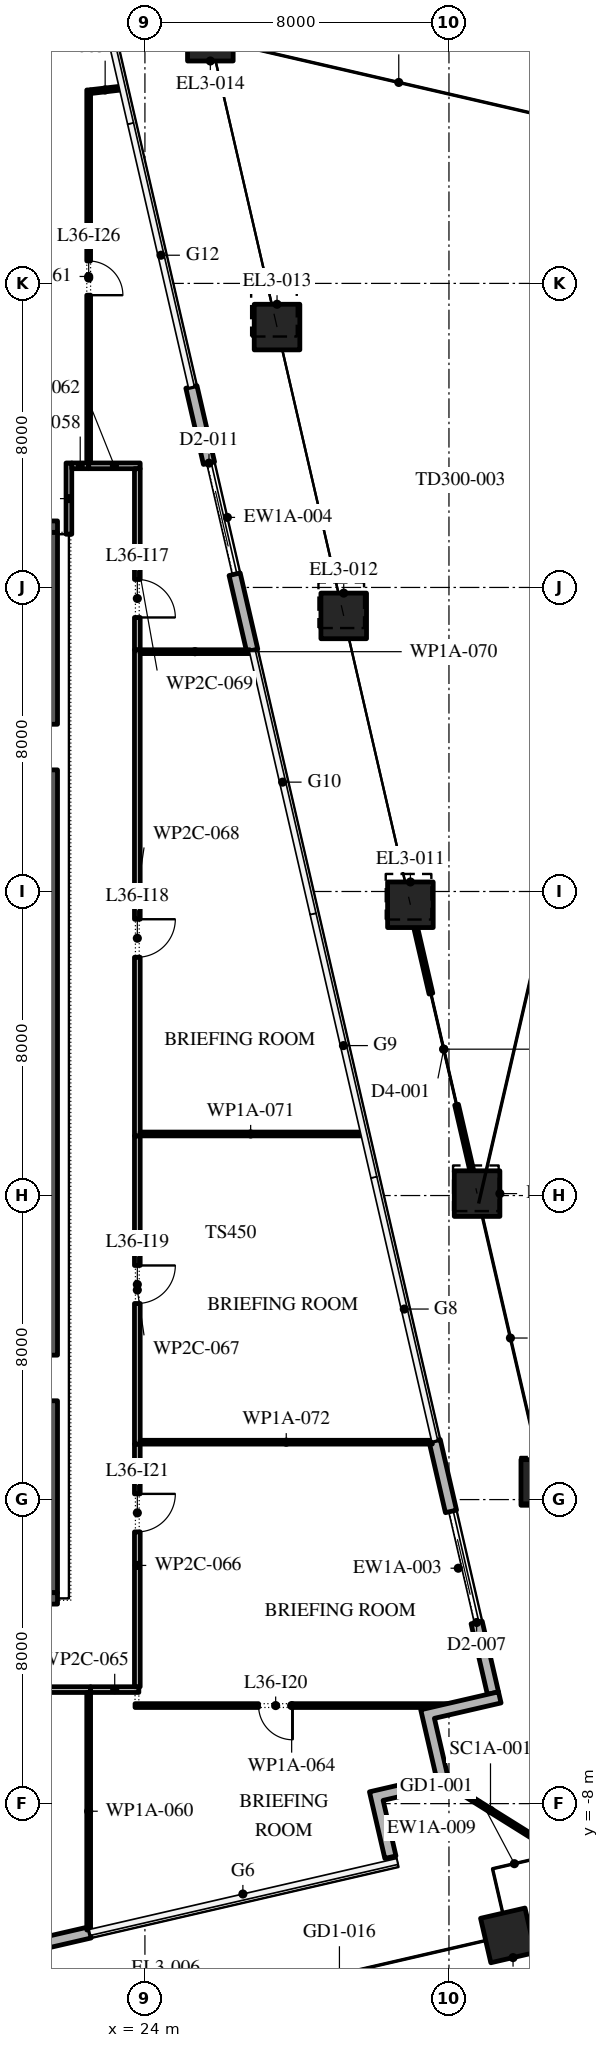
"""IFC4 building model, lengths in metres.
Left out: names, types, materials, properties, quantities, classifications, styles, units other than length and angle.
Written with IfcOpenShell. Run it as: python <this file> out.ifc"""

import sys

from ifc_helpers import new_model, si_unit, direction, frame, frame_2d, origin, origin_2d, place, context, subcontext, project, spatial, polyline, rectangle, outline, extrude, element, fill, save


model = new_model("IFC4")
c1 = context("Model", 3, precision=1e-05, world=origin(), true_north=direction((0.0, 1.0)))
c2 = subcontext(c1, "Body", "Model", "MODEL_VIEW")
j1 = project(units=[si_unit("LENGTHUNIT", "METRE"), si_unit("PLANEANGLEUNIT", "RADIAN")], contexts=[c1])
p1 = place(None, origin())
s1 = spatial("IfcSite", under=j1, at=p1, CompositionType="ELEMENT")
p2 = place(p1, origin())
s2 = spatial("IfcBuilding", under=s1, at=p2, CompositionType="ELEMENT")
p3 = place(p2, frame((0.0, 0.0, 165.6)))
s3 = spatial("IfcBuildingStorey", under=s2, at=p3, CompositionType="ELEMENT", Elevation=165.6)
p4 = place(p3, frame((33.551, -11.467, 0.0), z_axis=(0.0, 0.0, 1.0), x_axis=(0.974370064785, 0.224951054344, 0.0)))
e1 = element("IfcColumn", 1, at=p4, inside=s3, PredefinedType="COLUMN", context=c2, shape_type="SweptSolid", body=[
    extrude(rectangle(XDim=1.2, YDim=1.2, at=origin_2d()), origin(), (0.0, 0.0, 1.0), 6.0),
])
p5 = place(p3, frame((34.495, 0.451, 0.0), z_axis=(-0.00268535281, 0.01171790317, 0.999927737202), x_axis=(-0.974732318528, -0.223376156329, 0.0)))
e2 = element("IfcColumn", 2, at=p5, inside=s3, PredefinedType="COLUMN", context=c2, shape_type="SweptSolid", body=[
    extrude(rectangle(XDim=1.2, YDim=1.2, at=origin_2d()), origin(), (0.0, 0.0, 1.0), 6.0),
])
p6 = place(p3, frame((32.74, 8.051, 0.0), z_axis=(-0.005410224046, 0.023390066364, 0.999711775599), x_axis=(-0.974276841123, -0.225354469338, 0.0)))
e3 = element("IfcColumn", 3, at=p6, inside=s3, PredefinedType="COLUMN", context=c2, shape_type="SweptSolid", body=[
    extrude(rectangle(XDim=1.2, YDim=1.2, at=origin_2d()), origin(), (0.0, 0.0, 1.0), 6.002),
])
p7 = place(p3, frame((30.985, 15.651, 0.0), z_axis=(-0.008092077967, 0.035092780331, 0.999351297114), x_axis=(-0.97442924191, -0.22469457606, 0.0)))
e4 = element("IfcColumn", 4, at=p7, inside=s3, PredefinedType="COLUMN", context=c2, shape_type="SweptSolid", body=[
    extrude(rectangle(XDim=1.2, YDim=1.2, at=origin_2d()), origin(), (0.0, 0.0, 1.0), 6.004),
])
p8 = place(p3, frame((29.231, 23.251, 0.0), z_axis=(-0.010770466873, 0.046739761902, 0.998849033488), x_axis=(-0.974462553199, -0.224550066607, 0.0)))
e5 = element("IfcColumn", 5, at=p8, inside=s3, PredefinedType="COLUMN", context=c2, shape_type="SweptSolid", body=[
    extrude(rectangle(XDim=1.2, YDim=1.2, at=origin_2d()), origin(), (0.0, 0.0, 1.0), 6.007),
])
p9 = place(p3, frame((27.476, 30.851, 0.0), z_axis=(-0.013484854004, 0.058366672302, 0.998204132569), x_axis=(-0.974334026589, -0.225107095913, 0.0)))
e6 = element("IfcColumn", 6, at=p9, inside=s3, PredefinedType="COLUMN", context=c2, shape_type="SweptSolid", body=[
    extrude(rectangle(XDim=1.2, YDim=1.2, at=origin_2d()), origin(), (0.0, 0.0, 1.0), 6.011),
])
p10 = place(p3, frame((25.721, 38.452, 0.008), z_axis=(-0.016173896419, 0.069978516669, 0.997417371154), x_axis=(-0.974314851408, -0.225190075993, 0.0)))
e7 = element("IfcColumn", 7, at=p10, inside=s3, PredefinedType="COLUMN", context=c2, shape_type="SweptSolid", body=[
    extrude(rectangle(XDim=1.2, YDim=1.2, at=origin_2d()), origin(), (0.0, 0.0, 1.0), 6.008),
])
p11 = place(p3, frame((14.465, -13.256, 0.0), z_axis=(0.0, 0.0, 1.0), x_axis=(0.974368386566, 0.224958323385, 0.0)))
e8 = element("IfcWall", 8, at=p11, inside=s3, PredefinedType="STANDARD", context=c2, shape_type="SweptSolid", body=[
    extrude(rectangle(XDim=8.3, YDim=0.3, at=frame_2d((4.15, 0.0))), origin(), (0.0, 0.0, 1.0), 5.8),
])
p12 = place(p11, frame((2.65, 0.0, 0.0)))
e9 = element("IfcOpeningElement", 9, at=p12, cuts=e8, PredefinedType="OPENING", context=c2, shape_type="SweptSolid", body=[
    extrude(rectangle(XDim=3.0, YDim=3.5, at=frame_2d((1.5, 1.75))), frame((0.0, 0.16, 0.0), z_axis=(0.0, -1.0, 0.0), x_axis=(1.0, 0.0, 0.0)), (0.0, 0.0, 1.0), 0.32),
])
p13 = place(p3, frame((33.157, -5.092, 0.0), z_axis=(0.0, 0.0, 1.0), x_axis=(-0.224961553766, 0.974367640743, 0.0)))
e10 = element("IfcWall", 10, at=p13, inside=s3, PredefinedType="STANDARD", context=c2, shape_type="SweptSolid", body=[
    extrude(rectangle(XDim=6.814, YDim=0.3, at=frame_2d((3.407, 0.0))), origin(), (0.0, 0.0, 1.0), 5.8),
])
p14 = place(p13, frame((1.907, 0.0, 0.0)))
e11 = element("IfcOpeningElement", 11, at=p14, cuts=e10, PredefinedType="OPENING", context=c2, shape_type="SweptSolid", body=[
    extrude(rectangle(XDim=3.0, YDim=3.5, at=frame_2d((1.5, 1.75))), frame((0.0, 0.16, 0.0), z_axis=(0.0, -1.0, 0.0), x_axis=(1.0, 0.0, 0.0)), (0.0, 0.0, 1.0), 0.32),
])
p15 = place(p3, frame((26.823, 22.343, 0.0), z_axis=(0.0, 0.0, 1.0), x_axis=(-0.22494221161, 0.974372106249, 0.0)))
e12 = element("IfcWall", 12, at=p15, inside=s3, PredefinedType="STANDARD", context=c2, shape_type="SweptSolid", body=[
    extrude(rectangle(XDim=7.115, YDim=0.3, at=frame_2d((3.557, 0.0))), origin(), (0.0, 0.0, 1.0), 5.8),
])
p16 = place(p15, frame((2.057, 0.0, 0.0)))
e13 = element("IfcOpeningElement", 13, at=p16, cuts=e12, PredefinedType="OPENING", context=c2, shape_type="SweptSolid", body=[
    extrude(rectangle(XDim=3.0, YDim=3.5, at=frame_2d((1.5, 1.75))), frame((0.0, 0.16, 0.0), z_axis=(0.0, -1.0, 0.0), x_axis=(1.0, 0.0, 0.0)), (0.0, 0.0, 1.0), 0.32),
])
p17 = place(p3, origin())
e14 = element("IfcWall", 14, at=p17, inside=s3, PredefinedType="STANDARD", context=c2, shape_type="SweptSolid", body=[
    extrude(outline(polyline([(31.662, -7.285), (31.257, -5.531), (33.303, -5.058), (33.371, -5.351), (31.617, -5.756), (32.022, -7.51), (30.268, -7.914), (30.605, -9.376), (30.313, -9.443), (29.908, -7.69), (31.662, -7.285)])), origin(), (0.0, 0.0, 1.0), 5.8),
])
p18 = place(p3, frame((32.022, -7.51, 0.0), z_axis=(0.0, 0.0, 1.0), x_axis=(0.848047176257, -0.529920736377, 0.0)))
e15 = element("IfcWall", 15, at=p18, inside=s3, PredefinedType="STANDARD", context=c2, shape_type="SweptSolid", body=[
    extrude(rectangle(XDim=2.526, YDim=0.1, at=frame_2d((1.263, 0.0))), origin(), (0.0, 0.0, 1.0), 5.8),
])
p19 = place(p3, frame((32.601, 8.655, 0.0), z_axis=(0.0, 0.0, 1.0), x_axis=(-0.224973663593, 0.974364844752, 0.0)))
e16 = element("IfcWall", 16, at=p19, inside=s3, PredefinedType="STANDARD", context=c2, shape_type="SweptSolid", body=[
    extrude(rectangle(XDim=6.56, YDim=0.1, at=frame_2d((3.28, 0.0))), origin(), (0.0, 0.0, 1.0), 4.85),
])
p20 = place(p19, frame((1.78, 0.0, 0.0)))
e17 = element("IfcOpeningElement", 17, at=p20, cuts=e16, PredefinedType="OPENING", context=c2, shape_type="SweptSolid", body=[
    extrude(rectangle(XDim=3.0, YDim=3.5, at=frame_2d((1.5, 1.75))), frame((0.0, 0.06, 0.0), z_axis=(0.0, -1.0, 0.0), x_axis=(1.0, 0.0, 0.0)), (0.0, 0.0, 1.0), 0.12),
])
p21 = place(p3, frame((21.35, -2.45, 0.0), z_axis=(0.0, 0.0, 1.0), x_axis=(0.0, 1.0, 0.0)))
e18 = element("IfcWall", 18, at=p21, inside=s3, PredefinedType="SHEAR", context=c2, shape_type="SweptSolid", body=[
    extrude(rectangle(XDim=27.9, YDim=0.7, at=frame_2d((13.95, 0.0))), origin(), (0.0, 0.0, 1.0), 5.8),
])
p22 = place(p21, frame((5.05, 0.0, 0.0)))
e19 = element("IfcOpeningElement", 19, at=p22, cuts=e18, PredefinedType="OPENING", context=c2, shape_type="SweptSolid", body=[
    extrude(rectangle(XDim=1.2, YDim=2.1, at=frame_2d((0.6, 1.05))), frame((0.0, 0.36, 0.0), z_axis=(0.0, -1.0, 0.0), x_axis=(1.0, 0.0, 0.0)), (0.0, 0.0, 1.0), 0.72),
])
p23 = place(p21, frame((21.65, 0.0, 0.0)))
e20 = element("IfcOpeningElement", 20, at=p23, cuts=e18, PredefinedType="OPENING", context=c2, shape_type="SweptSolid", body=[
    extrude(rectangle(XDim=1.2, YDim=2.1, at=frame_2d((0.6, 1.05))), frame((0.0, 0.36, 0.0), z_axis=(0.0, -1.0, 0.0), x_axis=(1.0, 0.0, 0.0)), (0.0, 0.0, 1.0), 0.72),
])
for number, where, z_axis, x_axis in (
    (21, (10.3, -2.6, 0.0), (0.0, 0.0, 1.0), (1.0, 0.0, 0.0)),
    (22, (10.3, 25.6, 0.0), (0.0, 0.0, 1.0), (1.0, 0.0, 0.0)),
):
    element("IfcWall", number, at=place(p3, frame(where, z_axis=z_axis, x_axis=x_axis)), inside=s3, PredefinedType="SHEAR", context=c2, shape_type="SweptSolid", body=[
        extrude(rectangle(XDim=11.4, YDim=0.3, at=frame_2d((5.7, 0.0))), origin(), (0.0, 0.0, 1.0), 5.8),
    ])
p24 = place(p3, frame((22.0, 25.4, 0.0), z_axis=(0.0, 0.0, 1.0), x_axis=(0.0, 1.0, 0.0)))
e23 = element("IfcWall", 23, at=p24, inside=s3, PredefinedType="PARTITIONING", context=c2, shape_type="SweptSolid", body=[
    extrude(rectangle(XDim=1.875, YDim=0.15, at=frame_2d((0.938, 0.0))), origin(), (0.0, 0.0, 1.0), 5.8),
])
p25 = place(p3, frame((22.075, 27.2, 0.0), z_axis=(0.0, 0.0, 1.0), x_axis=(1.0, 0.0, 0.0)))
e24 = element("IfcWall", 24, at=p25, inside=s3, PredefinedType="PARTITIONING", context=c2, shape_type="SweptSolid", body=[
    extrude(rectangle(XDim=0.445, YDim=0.15, at=frame_2d((0.223, 0.0))), origin(), (0.0, 0.0, 1.0), 5.8),
])
p26 = place(p3, frame((22.57, -5.0, 0.0), z_axis=(0.0, 0.0, 1.0), x_axis=(-1.0, 0.0, 0.0)))
e25 = element("IfcWall", 25, at=p26, inside=s3, PredefinedType="PARTITIONING", context=c2, shape_type="SweptSolid", body=[
    extrude(rectangle(XDim=8.09, YDim=0.15, at=frame_2d((4.045, 0.0))), origin(), (0.0, 0.0, 1.0), 5.8),
])
p27 = place(p26, frame((4.49, 0.0, 0.0)))
e26 = element("IfcOpeningElement", 26, at=p27, cuts=e25, PredefinedType="OPENING", context=c2, shape_type="SweptSolid", body=[
    extrude(rectangle(XDim=1.0, YDim=2.1, at=frame_2d((0.5, 1.05))), frame((0.0, 0.085, 0.0), z_axis=(0.0, -1.0, 0.0), x_axis=(1.0, 0.0, 0.0)), (0.0, 0.0, 1.0), 0.17),
])
p28 = place(p3, frame((22.52, -5.075, 0.0), z_axis=(0.0, 0.0, 1.0), x_axis=(0.0, -1.0, 0.0)))
e27 = element("IfcWall", 27, at=p28, inside=s3, PredefinedType="PARTITIONING", context=c2, shape_type="SweptSolid", body=[
    extrude(rectangle(XDim=6.25, YDim=0.1, at=frame_2d((3.125, 0.0))), origin(), (0.0, 0.0, 1.0), 5.8),
])
p29 = place(p3, frame((22.52, 27.275, 0.0), z_axis=(0.0, 0.0, 1.0), x_axis=(0.0, 1.0, 0.0)))
e28 = element("IfcWall", 28, at=p29, inside=s3, PredefinedType="PARTITIONING", context=c2, shape_type="SweptSolid", body=[
    extrude(rectangle(XDim=9.815, YDim=0.1, at=frame_2d((4.908, 0.0))), origin(), (0.0, 0.0, 1.0), 5.8),
])
p30 = place(p29, frame((4.415, 0.0, 0.0)))
e29 = element("IfcOpeningElement", 29, at=p30, cuts=e28, PredefinedType="OPENING", context=c2, shape_type="SweptSolid", body=[
    extrude(rectangle(XDim=0.9, YDim=2.1, at=frame_2d((0.45, 1.05))), frame((0.0, 0.06, 0.0), z_axis=(0.0, -1.0, 0.0), x_axis=(1.0, 0.0, 0.0)), (0.0, 0.0, 1.0), 0.12),
])
p31 = place(p3, frame((22.52, 27.2, 0.0), z_axis=(0.0, 0.0, 1.0), x_axis=(1.0, 0.0, 0.0)))
e30 = element("IfcWall", 30, at=p31, inside=s3, PredefinedType="PARTITIONING", context=c2, shape_type="SweptSolid", body=[
    extrude(rectangle(XDim=1.355, YDim=0.15, at=frame_2d((0.677, 0.0))), origin(), (0.0, 0.0, 1.0), 5.8),
])
p32 = place(p3, frame((22.57, 37.046, 0.0), z_axis=(0.0, 0.0, 1.0), x_axis=(0.993315815268, 0.115428294356, 0.0)))
e31 = element("IfcWall", 31, at=p32, inside=s3, PredefinedType="PARTITIONING", context=c2, shape_type="SweptSolid", body=[
    extrude(rectangle(XDim=0.772, YDim=0.1, at=frame_2d((0.386, 0.0))), origin(), (0.0, 0.0, 1.0), 5.8),
])
p33 = place(p3, frame((23.74, -5.42, 0.0), z_axis=(0.0, 0.0, 1.0), x_axis=(1.0, 0.0, 0.0)))
e32 = element("IfcWall", 32, at=p33, inside=s3, PredefinedType="PARTITIONING", context=c2, shape_type="SweptSolid", body=[
    extrude(rectangle(XDim=8.242, YDim=0.1, at=frame_2d((4.121, 0.0))), origin(), (0.0, 0.0, 1.0), 5.8),
])
p34 = place(p33, frame((3.25, 0.0, 0.0)))
e33 = element("IfcOpeningElement", 33, at=p34, cuts=e32, PredefinedType="OPENING", context=c2, shape_type="SweptSolid", body=[
    extrude(rectangle(XDim=0.9, YDim=2.1, at=frame_2d((0.45, 1.05))), frame((0.0, 0.06, 0.0), z_axis=(0.0, -1.0, 0.0), x_axis=(1.0, 0.0, 0.0)), (0.0, 0.0, 1.0), 0.12),
])
p35 = place(p3, frame((23.84, -5.0, 0.0), z_axis=(0.0, 0.0, 1.0), x_axis=(-1.0, 0.0, 0.0)))
e34 = element("IfcWall", 34, at=p35, inside=s3, PredefinedType="PARTITIONING", context=c2, shape_type="SweptSolid", body=[
    extrude(rectangle(XDim=1.27, YDim=0.15, at=frame_2d((0.635, 0.0))), origin(), (0.0, 0.0, 1.0), 5.8),
])
p36 = place(p3, frame((23.8, 1.46, 0.0), z_axis=(0.0, 0.0, 1.0), x_axis=(0.0, -1.0, 0.0)))
e35 = element("IfcWall", 35, at=p36, inside=s3, PredefinedType="PARTITIONING", context=c2, shape_type="SweptSolid", body=[
    extrude(rectangle(XDim=6.385, YDim=0.15, at=frame_2d((3.192, 0.0))), origin(), (0.0, 0.0, 1.0), 5.8),
])
p37 = place(p36, frame((1.31, 0.0, 0.0)))
e36 = element("IfcOpeningElement", 36, at=p37, cuts=e35, PredefinedType="OPENING", context=c2, shape_type="SweptSolid", body=[
    extrude(rectangle(XDim=1.0, YDim=2.1, at=frame_2d((0.5, 1.05))), frame((0.0, 0.085, 0.0), z_axis=(0.0, -1.0, 0.0), x_axis=(1.0, 0.0, 0.0)), (0.0, 0.0, 1.0), 0.17),
])
p38 = place(p3, frame((23.8, 9.57, 0.0), z_axis=(0.0, 0.0, 1.0), x_axis=(0.0, -1.0, 0.0)))
e37 = element("IfcWall", 37, at=p38, inside=s3, PredefinedType="PARTITIONING", context=c2, shape_type="SweptSolid", body=[
    extrude(rectangle(XDim=8.11, YDim=0.15, at=frame_2d((4.055, 0.0))), origin(), (0.0, 0.0, 1.0), 5.8),
])
p39 = place(p38, frame((3.41, 0.0, 0.0)))
e38 = element("IfcOpeningElement", 38, at=p39, cuts=e37, PredefinedType="OPENING", context=c2, shape_type="SweptSolid", body=[
    extrude(rectangle(XDim=1.0, YDim=2.1, at=frame_2d((0.5, 1.05))), frame((0.0, 0.085, 0.0), z_axis=(0.0, -1.0, 0.0), x_axis=(1.0, 0.0, 0.0)), (0.0, 0.0, 1.0), 0.17),
])
p40 = place(p3, frame((23.8, 22.36, 0.0), z_axis=(0.0, 0.0, 1.0), x_axis=(0.0, -1.0, 0.0)))
e39 = element("IfcWall", 39, at=p40, inside=s3, PredefinedType="PARTITIONING", context=c2, shape_type="SweptSolid", body=[
    extrude(rectangle(XDim=12.79, YDim=0.15, at=frame_2d((6.395, 0.0))), origin(), (0.0, 0.0, 1.0), 5.8),
])
p41 = place(p40, frame((7.09, 0.0, 0.0)))
e40 = element("IfcOpeningElement", 40, at=p41, cuts=e39, PredefinedType="OPENING", context=c2, shape_type="SweptSolid", body=[
    extrude(rectangle(XDim=1.0, YDim=2.1, at=frame_2d((0.5, 1.05))), frame((0.0, 0.085, 0.0), z_axis=(0.0, -1.0, 0.0), x_axis=(1.0, 0.0, 0.0)), (0.0, 0.0, 1.0), 0.17),
])
p42 = place(p3, frame((23.8, 27.125, 0.0), z_axis=(0.0, 0.0, 1.0), x_axis=(0.0, -1.0, 0.0)))
e41 = element("IfcWall", 41, at=p42, inside=s3, PredefinedType="PARTITIONING", context=c2, shape_type="SweptSolid", body=[
    extrude(rectangle(XDim=4.765, YDim=0.15, at=frame_2d((2.382, 0.0))), origin(), (0.0, 0.0, 1.0), 5.8),
])
p43 = place(p42, frame((2.915, 0.0, 0.0)))
e42 = element("IfcOpeningElement", 42, at=p43, cuts=e41, PredefinedType="OPENING", context=c2, shape_type="SweptSolid", body=[
    extrude(rectangle(XDim=1.0, YDim=2.1, at=frame_2d((0.5, 1.05))), frame((0.0, 0.085, 0.0), z_axis=(0.0, -1.0, 0.0), x_axis=(1.0, 0.0, 0.0)), (0.0, 0.0, 1.0), 0.17),
])
p44 = place(p3, frame((26.76, 22.31, 0.0), z_axis=(0.0, 0.0, 1.0), x_axis=(-1.0, 0.0, 0.0)))
e43 = element("IfcWall", 43, at=p44, inside=s3, PredefinedType="PARTITIONING", context=c2, shape_type="SweptSolid", body=[
    extrude(rectangle(XDim=2.885, YDim=0.1, at=frame_2d((1.442, 0.0))), origin(), (0.0, 0.0, 1.0), 5.8),
])
p45 = place(p3, frame((29.689, 9.62, 0.0), z_axis=(0.0, 0.0, 1.0), x_axis=(-1.0, 0.0, 0.0)))
e44 = element("IfcWall", 44, at=p45, inside=s3, PredefinedType="PARTITIONING", context=c2, shape_type="SweptSolid", body=[
    extrude(rectangle(XDim=5.814, YDim=0.1, at=frame_2d((2.907, 0.0))), origin(), (0.0, 0.0, 1.0), 5.8),
])
p46 = place(p3, frame((31.562, 1.51, 0.0), z_axis=(0.0, 0.0, 1.0), x_axis=(-1.0, 0.0, 0.0)))
e45 = element("IfcWall", 45, at=p46, inside=s3, PredefinedType="PARTITIONING", context=c2, shape_type="SweptSolid", body=[
    extrude(rectangle(XDim=7.687, YDim=0.1, at=frame_2d((3.844, 0.0))), origin(), (0.0, 0.0, 1.0), 5.8),
])
p47 = place(p14, origin())
e46 = element("IfcDoor", 46, at=p47, inside=s3, OperationType="DOUBLE_DOOR_SLIDING", PredefinedType="DOOR", context=c2, shape_type="SweptSolid", body=[
    extrude(rectangle(XDim=3.0, YDim=3.5, at=frame_2d((1.5, 1.75))), frame((0.0, 0.025, 0.0), z_axis=(0.0, -1.0, 0.0), x_axis=(1.0, 0.0, 0.0)), (0.0, 0.0, 1.0), 0.05),
])
fill(e11, e46)
p48 = place(p16, origin())
e47 = element("IfcDoor", 47, at=p48, inside=s3, OperationType="DOUBLE_DOOR_SLIDING", PredefinedType="DOOR", context=c2, shape_type="SweptSolid", body=[
    extrude(rectangle(XDim=3.0, YDim=3.5, at=frame_2d((1.5, 1.75))), frame((0.0, 0.025, 0.0), z_axis=(0.0, -1.0, 0.0), x_axis=(1.0, 0.0, 0.0)), (0.0, 0.0, 1.0), 0.05),
])
fill(e13, e47)
p49 = place(p20, origin())
e48 = element("IfcDoor", 48, at=p49, inside=s3, OperationType="DOUBLE_DOOR_SLIDING", PredefinedType="DOOR", context=c2, shape_type="SweptSolid", body=[
    extrude(rectangle(XDim=3.0, YDim=3.5, at=frame_2d((1.5, 1.75))), frame((0.0, 0.025, 0.0), z_axis=(0.0, -1.0, 0.0), x_axis=(1.0, 0.0, 0.0)), (0.0, 0.0, 1.0), 0.05),
])
fill(e17, e48)
p50 = place(p43, origin())
e49 = element("IfcDoor", 49, at=p50, inside=s3, OperationType="SINGLE_SWING_LEFT", PredefinedType="DOOR", context=c2, shape_type="SweptSolid", body=[
    extrude(rectangle(XDim=1.0, YDim=2.1, at=frame_2d((0.5, 1.05))), frame((0.0, 0.025, 0.0), z_axis=(0.0, -1.0, 0.0), x_axis=(1.0, 0.0, 0.0)), (0.0, 0.0, 1.0), 0.05),
])
fill(e42, e49)
p51 = place(p41, origin())
e50 = element("IfcDoor", 50, at=p51, inside=s3, OperationType="SINGLE_SWING_RIGHT", PredefinedType="DOOR", context=c2, shape_type="SweptSolid", body=[
    extrude(rectangle(XDim=1.0, YDim=2.1, at=frame_2d((0.5, 1.05))), frame((0.0, 0.025, 0.0), z_axis=(0.0, -1.0, 0.0), x_axis=(1.0, 0.0, 0.0)), (0.0, 0.0, 1.0), 0.05),
])
fill(e40, e50)
p52 = place(p39, origin())
e51 = element("IfcDoor", 51, at=p52, inside=s3, OperationType="SINGLE_SWING_RIGHT", PredefinedType="DOOR", context=c2, shape_type="SweptSolid", body=[
    extrude(rectangle(XDim=1.0, YDim=2.1, at=frame_2d((0.5, 1.05))), frame((0.0, 0.025, 0.0), z_axis=(0.0, -1.0, 0.0), x_axis=(1.0, 0.0, 0.0)), (0.0, 0.0, 1.0), 0.05),
])
fill(e38, e51)
p53 = place(p34, frame((0.9, 0.0, 0.0), z_axis=(0.0, 0.0, 1.0), x_axis=(-1.0, 0.0, 0.0)))
e52 = element("IfcDoor", 52, at=p53, inside=s3, OperationType="SINGLE_SWING_RIGHT", PredefinedType="DOOR", context=c2, shape_type="SweptSolid", body=[
    extrude(rectangle(XDim=0.9, YDim=2.1, at=frame_2d((0.45, 1.05))), frame((0.0, 0.025, 0.0), z_axis=(0.0, -1.0, 0.0), x_axis=(1.0, 0.0, 0.0)), (0.0, 0.0, 1.0), 0.05),
])
fill(e33, e52)
p54 = place(p37, origin())
e53 = element("IfcDoor", 53, at=p54, inside=s3, OperationType="SINGLE_SWING_RIGHT", PredefinedType="DOOR", context=c2, shape_type="SweptSolid", body=[
    extrude(rectangle(XDim=1.0, YDim=2.1, at=frame_2d((0.5, 1.05))), frame((0.0, 0.025, 0.0), z_axis=(0.0, -1.0, 0.0), x_axis=(1.0, 0.0, 0.0)), (0.0, 0.0, 1.0), 0.05),
])
fill(e36, e53)
p55 = place(p30, frame((0.9, 0.0, 0.0), z_axis=(0.0, 0.0, 1.0), x_axis=(-1.0, 0.0, 0.0)))
e54 = element("IfcDoor", 54, at=p55, inside=s3, OperationType="SINGLE_SWING_LEFT", PredefinedType="DOOR", context=c2, shape_type="SweptSolid", body=[
    extrude(rectangle(XDim=0.9, YDim=2.1, at=frame_2d((0.45, 1.05))), frame((0.0, 0.025, 0.0), z_axis=(0.0, -1.0, 0.0), x_axis=(1.0, 0.0, 0.0)), (0.0, 0.0, 1.0), 0.05),
])
fill(e29, e54)
save(model, sys.argv[1])
